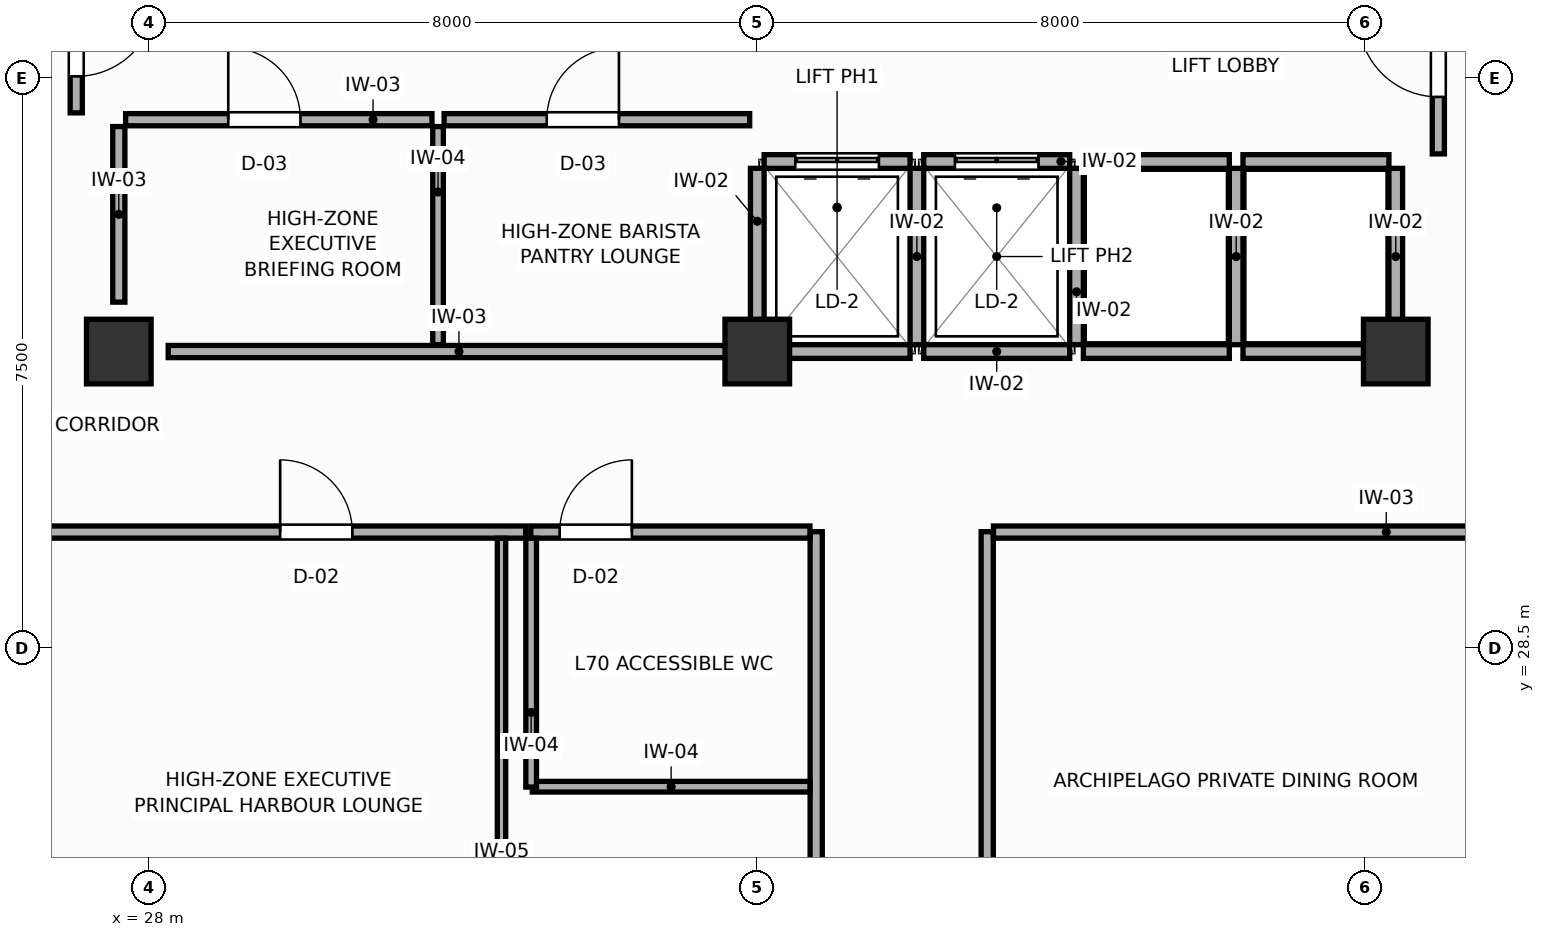
"""IFC4 building model, lengths in metres.
Left out: names, types, materials, properties, quantities, classifications, styles, units other than length and angle.
Written with IfcOpenShell. Run it as: python <this file> out.ifc"""

import sys

from ifc_helpers import new_model, si_unit, direction, frame, frame_2d, origin, origin_2d, place, context, subcontext, project, spatial, rectangle, extrude, source, transform, mapped, element, fill, save


model = new_model("IFC4")
c1 = context("Model", 3, precision=1e-05, world=origin(), true_north=direction((0.0, 1.0)))
c2 = subcontext(c1, "Body", "Model", "MODEL_VIEW")
j1 = project(units=[si_unit("LENGTHUNIT", "METRE"), si_unit("PLANEANGLEUNIT", "RADIAN")], contexts=[c1])
p1 = place(None, origin())
s1 = spatial("IfcSite", under=j1, at=p1, CompositionType="ELEMENT")
p2 = place(p1, origin())
s2 = spatial("IfcBuilding", under=s1, at=p2, CompositionType="ELEMENT")
p3 = place(p2, frame((0.0, 0.0, 268.2)))
s3 = spatial("IfcBuildingStorey", under=s2, at=p3, CompositionType="ELEMENT", Elevation=268.2)
m1 = source(origin(), c2, "Body", "SweptSolid", [
    extrude(rectangle(XDim=0.85, YDim=0.85, at=origin_2d()), origin(), (0.0, 0.0, 1.0), 3.6),
])
for number, where, z_axis, x_axis in (
    (1, (27.6, 32.4, 0.0), (0.0, 0.0, 1.0), (1.0, 0.0, 0.0)),
    (2, (44.4, 32.4, 0.0), (0.0, 0.0, 1.0), (1.0, 0.0, 0.0)),
    (3, (36.0, 32.4, 0.0), (0.0, 0.0, 1.0), (1.0, 0.0, 0.0)),
):
    element("IfcColumn", number, at=place(p3, frame(where, z_axis=z_axis, x_axis=x_axis)), inside=s3, PredefinedType="COLUMN", context=c2, shape_type="MappedRepresentation", body=[
        mapped(m1, transform((0.0, 0.0, 0.0), scale=1.0)),
    ])
p4 = place(p3, frame((36.09, 34.9, 0.0), z_axis=(0.0, 0.0, 1.0), x_axis=(1.0, 0.0, 0.0)))
e4 = element("IfcWall", 4, at=p4, inside=s3, PredefinedType="PARTITIONING", context=c2, shape_type="SweptSolid", body=[
    extrude(rectangle(XDim=1.92, YDim=0.18, at=frame_2d((0.96, 0.0))), origin(), (0.0, 0.0, 1.0), 3.41),
])
p5 = place(p4, frame((0.41, 0.0, 0.0)))
e5 = element("IfcOpeningElement", 5, at=p5, cuts=e4, PredefinedType="OPENING", context=c2, shape_type="SweptSolid", body=[
    extrude(rectangle(XDim=1.1, YDim=2.1, at=frame_2d((0.55, 1.05))), frame((0.0, 0.1, 0.0), z_axis=(0.0, -1.0, 0.0), x_axis=(1.0, 0.0, 0.0)), (0.0, 0.0, 1.0), 0.2),
])
p6 = place(p3, frame((36.09, 32.4, 0.0), z_axis=(0.0, 0.0, 1.0), x_axis=(1.0, 0.0, 0.0)))
e6 = element("IfcWall", 6, at=p6, inside=s3, PredefinedType="PARTITIONING", context=c2, shape_type="SweptSolid", body=[
    extrude(rectangle(XDim=1.92, YDim=0.18, at=frame_2d((0.96, 0.0))), origin(), (0.0, 0.0, 1.0), 3.08),
])
p7 = place(p3, frame((36.0, 32.49, 0.0), z_axis=(0.0, 0.0, 1.0), x_axis=(0.0, 1.0, 0.0)))
e7 = element("IfcWall", 7, at=p7, inside=s3, PredefinedType="PARTITIONING", context=c2, shape_type="SweptSolid", body=[
    extrude(rectangle(XDim=2.32, YDim=0.18, at=frame_2d((1.16, 0.0))), origin(), (0.0, 0.0, 1.0), 3.41),
])
p8 = place(p3, frame((38.19, 34.9, 0.0), z_axis=(0.0, 0.0, 1.0), x_axis=(1.0, 0.0, 0.0)))
e8 = element("IfcWall", 8, at=p8, inside=s3, PredefinedType="PARTITIONING", context=c2, shape_type="SweptSolid", body=[
    extrude(rectangle(XDim=1.92, YDim=0.18, at=frame_2d((0.96, 0.0))), origin(), (0.0, 0.0, 1.0), 3.41),
])
p9 = place(p8, frame((0.41, 0.0, 0.0)))
e9 = element("IfcOpeningElement", 9, at=p9, cuts=e8, PredefinedType="OPENING", context=c2, shape_type="SweptSolid", body=[
    extrude(rectangle(XDim=1.1, YDim=2.1, at=frame_2d((0.55, 1.05))), frame((0.0, 0.1, 0.0), z_axis=(0.0, -1.0, 0.0), x_axis=(1.0, 0.0, 0.0)), (0.0, 0.0, 1.0), 0.2),
])
p10 = place(p3, frame((38.19, 32.4, 0.0), z_axis=(0.0, 0.0, 1.0), x_axis=(1.0, 0.0, 0.0)))
e10 = element("IfcWall", 10, at=p10, inside=s3, PredefinedType="PARTITIONING", context=c2, shape_type="SweptSolid", body=[
    extrude(rectangle(XDim=1.92, YDim=0.18, at=frame_2d((0.96, 0.0))), origin(), (0.0, 0.0, 1.0), 3.08),
])
p11 = place(p3, frame((38.1, 32.49, 0.0), z_axis=(0.0, 0.0, 1.0), x_axis=(0.0, 1.0, 0.0)))
e11 = element("IfcWall", 11, at=p11, inside=s3, PredefinedType="PARTITIONING", context=c2, shape_type="SweptSolid", body=[
    extrude(rectangle(XDim=2.32, YDim=0.18, at=frame_2d((1.16, 0.0))), origin(), (0.0, 0.0, 1.0), 3.41),
])
p12 = place(p3, frame((40.29, 34.9, 0.0), z_axis=(0.0, 0.0, 1.0), x_axis=(1.0, 0.0, 0.0)))
e12 = element("IfcWall", 12, at=p12, inside=s3, PredefinedType="PARTITIONING", context=c2, shape_type="SweptSolid", body=[
    extrude(rectangle(XDim=1.92, YDim=0.18, at=frame_2d((0.96, 0.0))), origin(), (0.0, 0.0, 1.0), 3.41),
])
p13 = place(p3, frame((40.29, 32.4, 0.0), z_axis=(0.0, 0.0, 1.0), x_axis=(1.0, 0.0, 0.0)))
e13 = element("IfcWall", 13, at=p13, inside=s3, PredefinedType="PARTITIONING", context=c2, shape_type="SweptSolid", body=[
    extrude(rectangle(XDim=1.92, YDim=0.18, at=frame_2d((0.96, 0.0))), origin(), (0.0, 0.0, 1.0), 3.08),
])
p14 = place(p3, frame((40.2, 32.49, 0.0), z_axis=(0.0, 0.0, 1.0), x_axis=(0.0, 1.0, 0.0)))
e14 = element("IfcWall", 14, at=p14, inside=s3, PredefinedType="PARTITIONING", context=c2, shape_type="SweptSolid", body=[
    extrude(rectangle(XDim=2.32, YDim=0.18, at=frame_2d((1.16, 0.0))), origin(), (0.0, 0.0, 1.0), 3.41),
])
p15 = place(p3, frame((42.39, 34.9, 0.0), z_axis=(0.0, 0.0, 1.0), x_axis=(1.0, 0.0, 0.0)))
e15 = element("IfcWall", 15, at=p15, inside=s3, PredefinedType="PARTITIONING", context=c2, shape_type="SweptSolid", body=[
    extrude(rectangle(XDim=1.92, YDim=0.18, at=frame_2d((0.96, 0.0))), origin(), (0.0, 0.0, 1.0), 3.41),
])
p16 = place(p3, frame((42.39, 32.4, 0.0), z_axis=(0.0, 0.0, 1.0), x_axis=(1.0, 0.0, 0.0)))
e16 = element("IfcWall", 16, at=p16, inside=s3, PredefinedType="PARTITIONING", context=c2, shape_type="SweptSolid", body=[
    extrude(rectangle(XDim=1.92, YDim=0.18, at=frame_2d((0.96, 0.0))), origin(), (0.0, 0.0, 1.0), 3.08),
])
for number, where, z_axis, x_axis in (
    (17, (42.3, 32.49, 0.0), (0.0, 0.0, 1.0), (0.0, 1.0, 0.0)),
    (18, (44.4, 32.49, 0.0), (0.0, 0.0, 1.0), (0.0, 1.0, 0.0)),
):
    element("IfcWall", number, at=place(p3, frame(where, z_axis=z_axis, x_axis=x_axis)), inside=s3, PredefinedType="PARTITIONING", context=c2, shape_type="SweptSolid", body=[
        extrude(rectangle(XDim=2.32, YDim=0.18, at=frame_2d((1.16, 0.0))), origin(), (0.0, 0.0, 1.0), 3.41),
    ])
p17 = place(p3, frame((28.25, 32.4, 0.0), z_axis=(0.0, 0.0, 1.0), x_axis=(1.0, 0.0, 0.0)))
e19 = element("IfcWall", 19, at=p17, inside=s3, PredefinedType="PARTITIONING", context=c2, shape_type="SweptSolid", body=[
    extrude(rectangle(XDim=7.65, YDim=0.16, at=frame_2d((3.825, 0.0))), origin(), (0.0, 0.0, 1.0), 3.08),
])
p18 = place(p3, frame((27.6, 33.05, 0.0), z_axis=(0.0, 0.0, 1.0), x_axis=(0.0, 1.0, 0.0)))
e20 = element("IfcWall", 20, at=p18, inside=s3, PredefinedType="PARTITIONING", context=c2, shape_type="SweptSolid", body=[
    extrude(rectangle(XDim=2.31, YDim=0.16, at=frame_2d((1.155, 0.0))), origin(), (0.0, 0.0, 1.0), 3.41),
])
p19 = place(p3, frame((31.8, 32.49, 0.0), z_axis=(0.0, 0.0, 1.0), x_axis=(0.0, 1.0, 0.0)))
e21 = element("IfcWall", 21, at=p19, inside=s3, PredefinedType="PARTITIONING", context=c2, shape_type="SweptSolid", body=[
    extrude(rectangle(XDim=2.87, YDim=0.14, at=frame_2d((1.435, 0.0))), origin(), (0.0, 0.0, 1.0), 3.41),
])
p20 = place(p3, frame((27.69, 35.45, 0.0), z_axis=(0.0, 0.0, 1.0), x_axis=(1.0, 0.0, 0.0)))
e22 = element("IfcWall", 22, at=p20, inside=s3, PredefinedType="PARTITIONING", context=c2, shape_type="SweptSolid", body=[
    extrude(rectangle(XDim=4.03, YDim=0.16, at=frame_2d((2.015, 0.0))), origin(), (0.0, 0.0, 1.0), 3.41),
])
p21 = place(p20, frame((1.35, 0.0, 0.0)))
e23 = element("IfcOpeningElement", 23, at=p21, cuts=e22, PredefinedType="OPENING", context=c2, shape_type="SweptSolid", body=[
    extrude(rectangle(XDim=0.95, YDim=2.05, at=frame_2d((0.475, 1.025))), frame((0.0, 0.09, 0.0), z_axis=(0.0, -1.0, 0.0), x_axis=(1.0, 0.0, 0.0)), (0.0, 0.0, 1.0), 0.18),
])
p22 = place(p3, frame((31.88, 35.45, 0.0), z_axis=(0.0, 0.0, 1.0), x_axis=(1.0, 0.0, 0.0)))
e24 = element("IfcWall", 24, at=p22, inside=s3, PredefinedType="PARTITIONING", context=c2, shape_type="SweptSolid", body=[
    extrude(rectangle(XDim=4.02, YDim=0.16, at=frame_2d((2.01, 0.0))), origin(), (0.0, 0.0, 1.0), 3.41),
])
p23 = place(p22, frame((1.35, 0.0, 0.0)))
e25 = element("IfcOpeningElement", 25, at=p23, cuts=e24, PredefinedType="OPENING", context=c2, shape_type="SweptSolid", body=[
    extrude(rectangle(XDim=0.95, YDim=2.05, at=frame_2d((0.475, 1.025))), frame((0.0, 0.09, 0.0), z_axis=(0.0, -1.0, 0.0), x_axis=(1.0, 0.0, 0.0)), (0.0, 0.0, 1.0), 0.18),
])
p24 = place(p3, frame((27.04, 35.54, 0.0), z_axis=(0.0, 0.0, 1.0), x_axis=(0.0, 1.0, 0.0)))
e26 = element("IfcWall", 26, at=p24, inside=s3, PredefinedType="PARTITIONING", context=c2, shape_type="SweptSolid", body=[
    extrude(rectangle(XDim=2.11, YDim=0.16, at=frame_2d((1.055, 0.0))), origin(), (0.0, 0.0, 1.0), 3.41),
])
p25 = place(p24, frame((0.48, 0.0, 0.0)))
e27 = element("IfcOpeningElement", 27, at=p25, cuts=e26, PredefinedType="OPENING", context=c2, shape_type="SweptSolid", body=[
    extrude(rectangle(XDim=1.05, YDim=2.1, at=frame_2d((0.525, 1.05))), frame((0.0, 0.09, 0.0), z_axis=(0.0, -1.0, 0.0), x_axis=(1.0, 0.0, 0.0)), (0.0, 0.0, 1.0), 0.18),
])
p26 = place(p3, frame((44.96, 35.0, 0.0), z_axis=(0.0, 0.0, 1.0), x_axis=(0.0, 1.0, 0.0)))
e28 = element("IfcWall", 28, at=p26, inside=s3, PredefinedType="PARTITIONING", context=c2, shape_type="SweptSolid", body=[
    extrude(rectangle(XDim=2.65, YDim=0.16, at=frame_2d((1.325, 0.0))), origin(), (0.0, 0.0, 1.0), 3.41),
])
p27 = place(p26, frame((0.75, 0.0, 0.0)))
e29 = element("IfcOpeningElement", 29, at=p27, cuts=e28, PredefinedType="OPENING", context=c2, shape_type="SweptSolid", body=[
    extrude(rectangle(XDim=1.05, YDim=2.1, at=frame_2d((0.525, 1.05))), frame((0.0, 0.09, 0.0), z_axis=(0.0, -1.0, 0.0), x_axis=(1.0, 0.0, 0.0)), (0.0, 0.0, 1.0), 0.18),
])
p28 = place(p3, frame((36.775, 13.156, 0.0), z_axis=(0.0, 0.0, 1.0), x_axis=(0.0, 1.0, 0.0)))
e30 = element("IfcWall", 30, at=p28, inside=s3, PredefinedType="PARTITIONING", context=c2, shape_type="SweptSolid", body=[
    extrude(rectangle(XDim=16.875, YDim=0.16, at=frame_2d((8.437, 0.0))), origin(), (0.0, 0.0, 1.0), 3.08),
])
p29 = place(p28, frame((5.245, 0.0, 0.0)))
e31 = element("IfcOpeningElement", 31, at=p29, cuts=e30, PredefinedType="OPENING", context=c2, shape_type="SweptSolid", body=[
    extrude(rectangle(XDim=0.95, YDim=2.05, at=frame_2d((0.475, 1.025))), frame((0.0, 0.09, 0.0), z_axis=(0.0, -1.0, 0.0), x_axis=(1.0, 0.0, 0.0)), (0.0, 0.0, 1.0), 0.18),
])
p30 = place(p3, frame((39.025, 15.245, 0.0), z_axis=(0.0, 0.0, 1.0), x_axis=(0.0, 1.0, 0.0)))
e32 = element("IfcWall", 32, at=p30, inside=s3, PredefinedType="PARTITIONING", context=c2, shape_type="SweptSolid", body=[
    extrude(rectangle(XDim=14.785, YDim=0.16, at=frame_2d((7.393, 0.0))), origin(), (0.0, 0.0, 1.0), 3.41),
])
p31 = place(p30, frame((6.377, 0.0, 0.0)))
e33 = element("IfcOpeningElement", 33, at=p31, cuts=e32, PredefinedType="OPENING", context=c2, shape_type="SweptSolid", body=[
    extrude(rectangle(XDim=0.95, YDim=2.05, at=frame_2d((0.475, 1.025))), frame((0.0, 0.09, 0.0), z_axis=(0.0, -1.0, 0.0), x_axis=(1.0, 0.0, 0.0)), (0.0, 0.0, 1.0), 0.18),
])
p32 = place(p3, frame((39.107, 30.025, 0.0), z_axis=(0.0, 0.0, 1.0), x_axis=(1.0, 0.0, 0.0)))
e34 = element("IfcWall", 34, at=p32, inside=s3, PredefinedType="PARTITIONING", context=c2, shape_type="SweptSolid", body=[
    extrude(rectangle(XDim=10.336, YDim=0.16, at=frame_2d((5.168, 0.0))), origin(), (0.0, 0.0, 1.0), 3.41),
])
p33 = place(p3, frame((22.557, 30.025, 0.0), z_axis=(0.0, 0.0, 1.0), x_axis=(1.0, 0.0, 0.0)))
e35 = element("IfcWall", 35, at=p33, inside=s3, PredefinedType="PARTITIONING", context=c2, shape_type="SweptSolid", body=[
    extrude(rectangle(XDim=10.396, YDim=0.16, at=frame_2d((5.198, 0.0))), origin(), (0.0, 0.0, 1.0), 3.41),
])
p34 = place(p33, frame((7.166, 0.0, 0.0)))
e36 = element("IfcOpeningElement", 36, at=p34, cuts=e35, PredefinedType="OPENING", context=c2, shape_type="SweptSolid", body=[
    extrude(rectangle(XDim=0.95, YDim=2.05, at=frame_2d((0.475, 1.025))), frame((0.0, 0.09, 0.0), z_axis=(0.0, -1.0, 0.0), x_axis=(1.0, 0.0, 0.0)), (0.0, 0.0, 1.0), 0.18),
])
p35 = place(p3, frame((33.02, 30.025, 0.0), z_axis=(0.0, 0.0, 1.0), x_axis=(1.0, 0.0, 0.0)))
e37 = element("IfcWall", 37, at=p35, inside=s3, PredefinedType="PARTITIONING", context=c2, shape_type="SweptSolid", body=[
    extrude(rectangle(XDim=3.673, YDim=0.16, at=frame_2d((1.836, 0.0))), origin(), (0.0, 0.0, 1.0), 3.41),
])
p36 = place(p35, frame((0.38, 0.0, 0.0)))
e38 = element("IfcOpeningElement", 38, at=p36, cuts=e37, PredefinedType="OPENING", context=c2, shape_type="SweptSolid", body=[
    extrude(rectangle(XDim=0.95, YDim=2.05, at=frame_2d((0.475, 1.025))), frame((0.0, 0.09, 0.0), z_axis=(0.0, -1.0, 0.0), x_axis=(1.0, 0.0, 0.0)), (0.0, 0.0, 1.0), 0.18),
])
p37 = place(p3, frame((32.635, 23.41, 0.0), z_axis=(0.0, 0.0, 1.0), x_axis=(0.0, 1.0, 0.0)))
e39 = element("IfcWall", 39, at=p37, inside=s3, PredefinedType="MOVABLE", context=c2, shape_type="SweptSolid", body=[
    extrude(rectangle(XDim=6.533, YDim=0.11, at=frame_2d((3.267, 0.0))), origin(), (0.0, 0.0, 1.0), 3.41),
])
p38 = place(p3, frame((33.04, 26.675, 0.0), z_axis=(0.0, 0.0, 1.0), x_axis=(1.0, 0.0, 0.0)))
e40 = element("IfcWall", 40, at=p38, inside=s3, PredefinedType="PARTITIONING", context=c2, shape_type="SweptSolid", body=[
    extrude(rectangle(XDim=3.653, YDim=0.14, at=frame_2d((1.827, 0.0))), origin(), (0.0, 0.0, 1.0), 3.41),
])
p39 = place(p3, frame((33.025, 26.67, 0.0), z_axis=(0.0, 0.0, 1.0), x_axis=(0.0, 1.0, 0.0)))
e41 = element("IfcWall", 41, at=p39, inside=s3, PredefinedType="PARTITIONING", context=c2, shape_type="SweptSolid", body=[
    extrude(rectangle(XDim=3.273, YDim=0.14, at=frame_2d((1.637, 0.0))), origin(), (0.0, 0.0, 1.0), 3.41),
])
p40 = place(p5, origin())
e42 = element("IfcDoor", 42, at=p40, inside=s3, OperationType="DOUBLE_DOOR_SLIDING", PredefinedType="DOOR", context=c2, shape_type="SweptSolid", body=[
    extrude(rectangle(XDim=1.1, YDim=2.1, at=frame_2d((0.55, 1.05))), frame((0.0, 0.025, 0.0), z_axis=(0.0, -1.0, 0.0), x_axis=(1.0, 0.0, 0.0)), (0.0, 0.0, 1.0), 0.05),
])
fill(e5, e42)
p41 = place(p9, origin())
e43 = element("IfcDoor", 43, at=p41, inside=s3, OperationType="DOUBLE_DOOR_SLIDING", PredefinedType="DOOR", context=c2, shape_type="SweptSolid", body=[
    extrude(rectangle(XDim=1.1, YDim=2.1, at=frame_2d((0.55, 1.05))), frame((0.0, 0.025, 0.0), z_axis=(0.0, -1.0, 0.0), x_axis=(1.0, 0.0, 0.0)), (0.0, 0.0, 1.0), 0.05),
])
fill(e9, e43)
p42 = place(p21, origin())
e44 = element("IfcDoor", 44, at=p42, inside=s3, OperationType="SINGLE_SWING_LEFT", PredefinedType="DOOR", context=c2, shape_type="SweptSolid", body=[
    extrude(rectangle(XDim=0.95, YDim=2.05, at=frame_2d((0.475, 1.025))), frame((0.0, 0.025, 0.0), z_axis=(0.0, -1.0, 0.0), x_axis=(1.0, 0.0, 0.0)), (0.0, 0.0, 1.0), 0.05),
])
fill(e23, e44)
p43 = place(p23, origin())
e45 = element("IfcDoor", 45, at=p43, inside=s3, OperationType="SINGLE_SWING_RIGHT", PredefinedType="DOOR", context=c2, shape_type="SweptSolid", body=[
    extrude(rectangle(XDim=0.95, YDim=2.05, at=frame_2d((0.475, 1.025))), frame((0.0, 0.025, 0.0), z_axis=(0.0, -1.0, 0.0), x_axis=(1.0, 0.0, 0.0)), (0.0, 0.0, 1.0), 0.05),
])
fill(e25, e45)
p44 = place(p25, frame((1.05, 0.0, 0.0), z_axis=(0.0, 0.0, 1.0), x_axis=(-1.0, 0.0, 0.0)))
e46 = element("IfcDoor", 46, at=p44, inside=s3, OperationType="SINGLE_SWING_LEFT", PredefinedType="DOOR", context=c2, shape_type="SweptSolid", body=[
    extrude(rectangle(XDim=1.05, YDim=2.1, at=frame_2d((0.525, 1.05))), frame((0.0, 0.025, 0.0), z_axis=(0.0, -1.0, 0.0), x_axis=(1.0, 0.0, 0.0)), (0.0, 0.0, 1.0), 0.05),
])
fill(e27, e46)
p45 = place(p27, origin())
e47 = element("IfcDoor", 47, at=p45, inside=s3, OperationType="SINGLE_SWING_RIGHT", PredefinedType="DOOR", context=c2, shape_type="SweptSolid", body=[
    extrude(rectangle(XDim=1.05, YDim=2.1, at=frame_2d((0.525, 1.05))), frame((0.0, 0.025, 0.0), z_axis=(0.0, -1.0, 0.0), x_axis=(1.0, 0.0, 0.0)), (0.0, 0.0, 1.0), 0.05),
])
fill(e29, e47)
p46 = place(p34, origin())
e48 = element("IfcDoor", 48, at=p46, inside=s3, OperationType="SINGLE_SWING_LEFT", PredefinedType="DOOR", context=c2, shape_type="SweptSolid", body=[
    extrude(rectangle(XDim=0.95, YDim=2.05, at=frame_2d((0.475, 1.025))), frame((0.0, 0.025, 0.0), z_axis=(0.0, -1.0, 0.0), x_axis=(1.0, 0.0, 0.0)), (0.0, 0.0, 1.0), 0.05),
])
fill(e36, e48)
p47 = place(p36, origin())
e49 = element("IfcDoor", 49, at=p47, inside=s3, OperationType="SINGLE_SWING_RIGHT", PredefinedType="DOOR", context=c2, shape_type="SweptSolid", body=[
    extrude(rectangle(XDim=0.95, YDim=2.05, at=frame_2d((0.475, 1.025))), frame((0.0, 0.025, 0.0), z_axis=(0.0, -1.0, 0.0), x_axis=(1.0, 0.0, 0.0)), (0.0, 0.0, 1.0), 0.05),
])
fill(e38, e49)
save(model, sys.argv[1])
